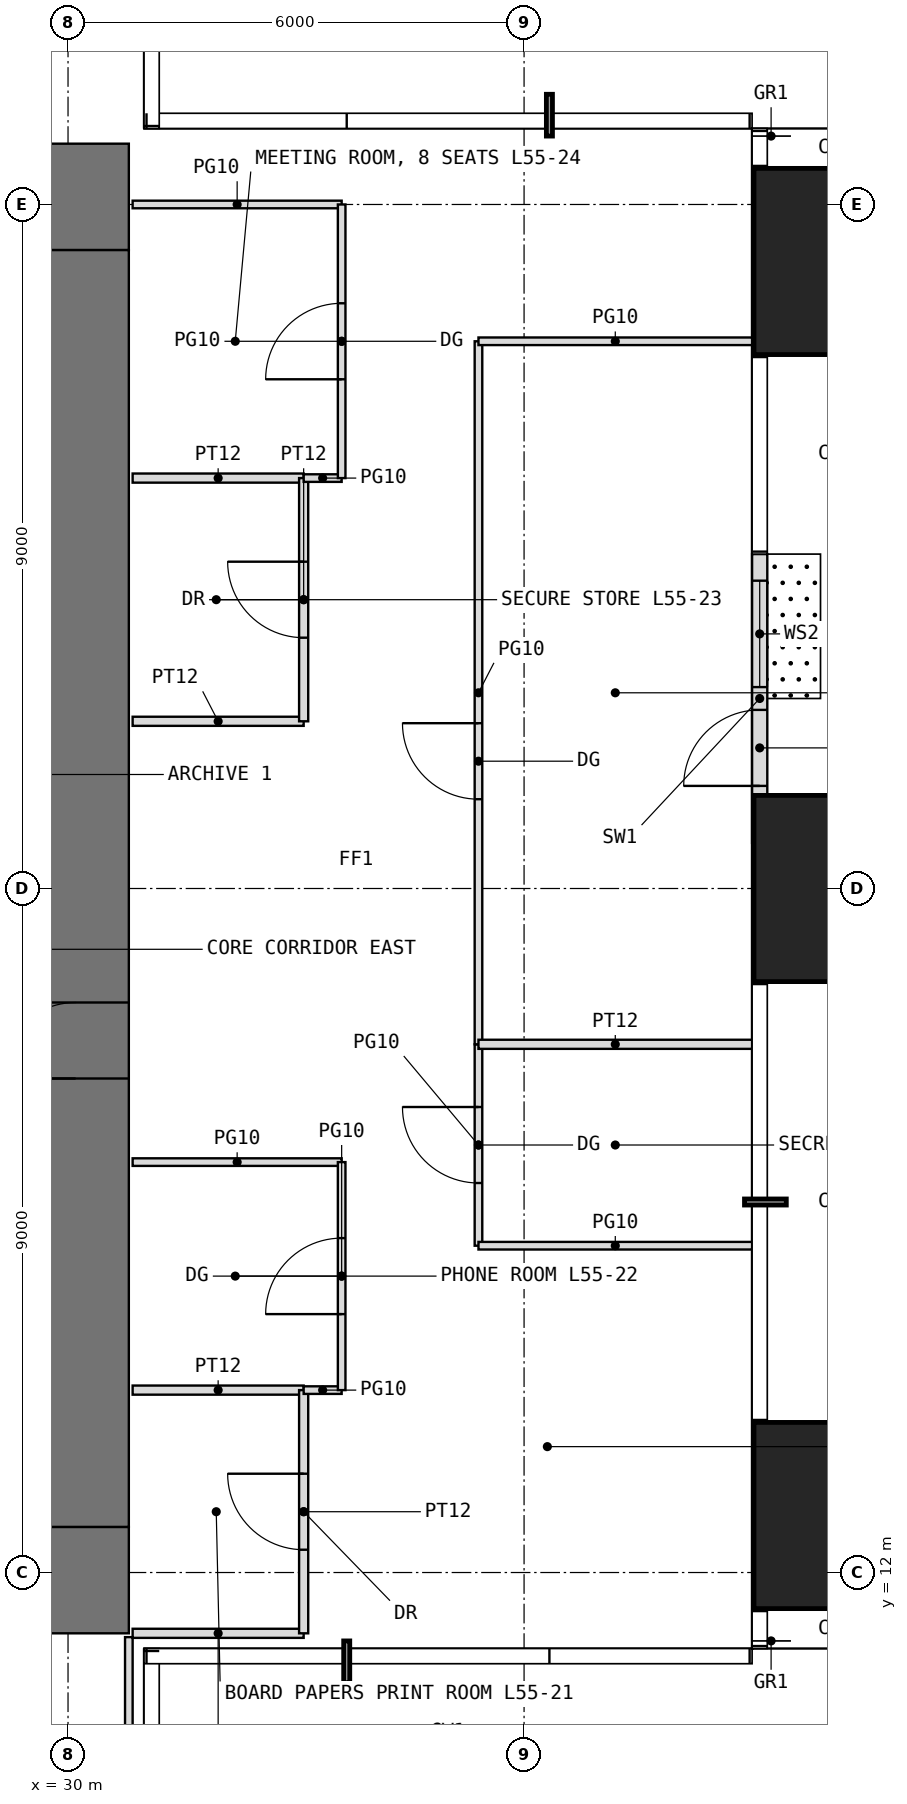
"""IFC4 building model, lengths in metres.
Left out: names, types, materials, properties, quantities, classifications, styles, units other than length and angle.
Written with IfcOpenShell. Run it as: python <this file> out.ifc"""

import sys

from ifc_helpers import new_model, si_unit, direction, frame, frame_2d, origin, origin_2d, place, context, subcontext, project, spatial, rectangle, extrude, element, fill, save


model = new_model("IFC4")
c1 = context("Model", 3, precision=1e-05, world=origin(), true_north=direction((0.0, 1.0)))
c2 = subcontext(c1, "Body", "Model", "MODEL_VIEW")
j1 = project(units=[si_unit("LENGTHUNIT", "METRE"), si_unit("PLANEANGLEUNIT", "RADIAN")], contexts=[c1])
p1 = place(None, origin())
s1 = spatial("IfcSite", under=j1, at=p1, CompositionType="ELEMENT")
p2 = place(p1, origin())
s2 = spatial("IfcBuilding", under=s1, at=p2, CompositionType="ELEMENT")
p3 = place(p2, frame((0.0, 0.0, 230.5)))
s3 = spatial("IfcBuildingStorey", under=s2, at=p3, CompositionType="ELEMENT", Elevation=230.5)
for number, where, z_axis, x_axis in (
    (1, (40.25, 12.75, 0.0), (0.0, 0.0, 1.0), (1.0, 0.0, 0.0)),
    (2, (40.25, 21.0, 0.0), (0.0, 0.0, 1.0), (1.0, 0.0, 0.0)),
    (3, (40.25, 29.25, 0.0), (0.0, 0.0, 1.0), (1.0, 0.0, 0.0)),
):
    element("IfcColumn", number, at=place(p3, frame(where, z_axis=z_axis, x_axis=x_axis)), inside=s3, PredefinedType="COLUMN", context=c2, shape_type="SweptSolid", body=[
        extrude(rectangle(XDim=2.45, YDim=2.45, at=origin_2d()), origin(), (0.0, 0.0, 1.0), 4.0),
    ])
p4 = place(p3, frame((39.1, 21.6, 0.0), z_axis=(0.0, 0.0, 1.0), x_axis=(0.0, 1.0, 0.0)))
e4 = element("IfcWall", 4, at=p4, inside=s3, PredefinedType="USERDEFINED", context=c2, shape_type="SweptSolid", body=[
    extrude(rectangle(XDim=3.8, YDim=0.2, at=frame_2d((1.9, 0.0))), origin(), (0.0, 0.0, 1.0), 3.55),
])
p5 = place(p4, frame((0.75, 0.0, 0.0)))
e5 = element("IfcOpeningElement", 5, at=p5, cuts=e4, PredefinedType="OPENING", context=c2, shape_type="SweptSolid", body=[
    extrude(rectangle(XDim=1.0, YDim=2.4, at=frame_2d((0.5, 1.2))), frame((0.0, 0.11, 0.0), z_axis=(0.0, -1.0, 0.0), x_axis=(1.0, 0.0, 0.0)), (0.0, 0.0, 1.0), 0.22),
])
p6 = place(p4, frame((2.05, 0.0, 0.3)))
e6 = element("IfcOpeningElement", 6, at=p6, cuts=e4, PredefinedType="OPENING", context=c2, shape_type="SweptSolid", body=[
    extrude(rectangle(XDim=1.4, YDim=2.7, at=frame_2d((0.7, 1.35))), frame((0.0, 0.11, 0.0), z_axis=(0.0, -1.0, 0.0), x_axis=(1.0, 0.0, 0.0)), (0.0, 0.0, 1.0), 0.22),
])
p7 = place(p3, frame((11.2, 11.9, -0.05), z_axis=(0.0, 0.0, 1.0), x_axis=(1.0, 0.0, 0.0)))
e7 = element("IfcWall", 7, at=p7, inside=s3, PredefinedType="SHEAR", context=c2, shape_type="SweptSolid", body=[
    extrude(rectangle(XDim=19.6, YDim=1.4, at=frame_2d((9.8, 0.0))), origin(), (0.0, 0.0, 1.0), 3.8),
])
p8 = place(p7, frame((8.8, 0.0, 0.05)))
e8 = element("IfcOpeningElement", 8, at=p8, cuts=e7, PredefinedType="OPENING", context=c2, shape_type="SweptSolid", body=[
    extrude(rectangle(XDim=2.0, YDim=2.2, at=frame_2d((1.0, 1.1))), frame((0.0, 0.71, 0.0), z_axis=(0.0, -1.0, 0.0), x_axis=(1.0, 0.0, 0.0)), (0.0, 0.0, 1.0), 1.42),
])
p9 = place(p3, frame((11.2, 30.1, -0.05), z_axis=(0.0, 0.0, 1.0), x_axis=(1.0, 0.0, 0.0)))
e9 = element("IfcWall", 9, at=p9, inside=s3, PredefinedType="SHEAR", context=c2, shape_type="SweptSolid", body=[
    extrude(rectangle(XDim=19.6, YDim=1.4, at=frame_2d((9.8, 0.0))), origin(), (0.0, 0.0, 1.0), 3.8),
])
p10 = place(p9, frame((8.8, 0.0, 0.05)))
e10 = element("IfcOpeningElement", 10, at=p10, cuts=e9, PredefinedType="OPENING", context=c2, shape_type="SweptSolid", body=[
    extrude(rectangle(XDim=2.0, YDim=2.2, at=frame_2d((1.0, 1.1))), frame((0.0, 0.71, 0.0), z_axis=(0.0, -1.0, 0.0), x_axis=(1.0, 0.0, 0.0)), (0.0, 0.0, 1.0), 1.42),
])
p11 = place(p3, frame((30.1, 12.6, -0.05), z_axis=(0.0, 0.0, 1.0), x_axis=(0.0, 1.0, 0.0)))
e11 = element("IfcWall", 11, at=p11, inside=s3, PredefinedType="SHEAR", context=c2, shape_type="SweptSolid", body=[
    extrude(rectangle(XDim=16.8, YDim=1.4, at=frame_2d((8.4, 0.0))), origin(), (0.0, 0.0, 1.0), 3.8),
])
p12 = place(p11, frame((5.9, 0.0, 0.05)))
e12 = element("IfcOpeningElement", 12, at=p12, cuts=e11, PredefinedType="OPENING", context=c2, shape_type="SweptSolid", body=[
    extrude(rectangle(XDim=1.0, YDim=2.2, at=frame_2d((0.5, 1.1))), frame((0.0, 0.71, 0.0), z_axis=(0.0, -1.0, 0.0), x_axis=(1.0, 0.0, 0.0)), (0.0, 0.0, 1.0), 1.42),
])
p13 = place(p3, frame((30.8, 6.6, 0.0), z_axis=(0.0, 0.0, 1.0), x_axis=(0.0, 1.0, 0.0)))
e13 = element("IfcWall", 13, at=p13, inside=s3, PredefinedType="PARTITIONING", context=c2, shape_type="SweptSolid", body=[
    extrude(rectangle(XDim=4.55, YDim=0.1, at=frame_2d((2.275, 0.0))), origin(), (0.0, 0.0, 1.0), 3.55),
])
for number, where, z_axis, x_axis in (
    (14, (30.85, 11.2, 0.0), (0.0, 0.0, 1.0), (1.0, 0.0, 0.0)),
    (15, (30.85, 14.4, 0.0), (0.0, 0.0, 1.0), (1.0, 0.0, 0.0)),
):
    element("IfcWall", number, at=place(p3, frame(where, z_axis=z_axis, x_axis=x_axis)), inside=s3, PredefinedType="PARTITIONING", context=c2, shape_type="SweptSolid", body=[
        extrude(rectangle(XDim=2.25, YDim=0.12, at=frame_2d((1.125, 0.0))), origin(), (0.0, 0.0, 1.0), 3.55),
    ])
p14 = place(p3, frame((30.85, 17.4, 0.0), z_axis=(0.0, 0.0, 1.0), x_axis=(1.0, 0.0, 0.0)))
e16 = element("IfcWall", 16, at=p14, inside=s3, PredefinedType="PARTITIONING", context=c2, shape_type="SweptSolid", body=[
    extrude(rectangle(XDim=2.75, YDim=0.1, at=frame_2d((1.375, 0.0))), origin(), (0.0, 0.0, 1.0), 3.55),
])
for number, where, z_axis, x_axis in (
    (17, (30.85, 23.2, 0.0), (0.0, 0.0, 1.0), (1.0, 0.0, 0.0)),
    (18, (30.85, 26.4, 0.0), (0.0, 0.0, 1.0), (1.0, 0.0, 0.0)),
):
    element("IfcWall", number, at=place(p3, frame(where, z_axis=z_axis, x_axis=x_axis)), inside=s3, PredefinedType="PARTITIONING", context=c2, shape_type="SweptSolid", body=[
        extrude(rectangle(XDim=2.25, YDim=0.12, at=frame_2d((1.125, 0.0))), origin(), (0.0, 0.0, 1.0), 3.55),
    ])
p15 = place(p3, frame((30.85, 30.0, 0.0), z_axis=(0.0, 0.0, 1.0), x_axis=(1.0, 0.0, 0.0)))
e19 = element("IfcWall", 19, at=p15, inside=s3, PredefinedType="PARTITIONING", context=c2, shape_type="SweptSolid", body=[
    extrude(rectangle(XDim=2.75, YDim=0.1, at=frame_2d((1.375, 0.0))), origin(), (0.0, 0.0, 1.0), 3.55),
])
p16 = place(p3, frame((33.1, 11.2, 0.0), z_axis=(0.0, 0.0, 1.0), x_axis=(0.0, 1.0, 0.0)))
e20 = element("IfcWall", 20, at=p16, inside=s3, PredefinedType="PARTITIONING", context=c2, shape_type="SweptSolid", body=[
    extrude(rectangle(XDim=3.2, YDim=0.12, at=frame_2d((1.6, 0.0))), origin(), (0.0, 0.0, 1.0), 3.55),
])
p17 = place(p16, frame((1.1, 0.0, 0.0)))
e21 = element("IfcOpeningElement", 21, at=p17, cuts=e20, PredefinedType="OPENING", context=c2, shape_type="SweptSolid", body=[
    extrude(rectangle(XDim=1.0, YDim=2.2, at=frame_2d((0.5, 1.1))), frame((0.0, 0.07, 0.0), z_axis=(0.0, -1.0, 0.0), x_axis=(1.0, 0.0, 0.0)), (0.0, 0.0, 1.0), 0.14),
])
p18 = place(p3, frame((33.1, 14.4, 0.0), z_axis=(0.0, 0.0, 1.0), x_axis=(1.0, 0.0, 0.0)))
e22 = element("IfcWall", 22, at=p18, inside=s3, PredefinedType="PARTITIONING", context=c2, shape_type="SweptSolid", body=[
    extrude(rectangle(XDim=0.5, YDim=0.1, at=frame_2d((0.25, 0.0))), origin(), (0.0, 0.0, 1.0), 3.55),
])
p19 = place(p3, frame((33.1, 23.2, 0.0), z_axis=(0.0, 0.0, 1.0), x_axis=(0.0, 1.0, 0.0)))
e23 = element("IfcWall", 23, at=p19, inside=s3, PredefinedType="PARTITIONING", context=c2, shape_type="SweptSolid", body=[
    extrude(rectangle(XDim=3.2, YDim=0.12, at=frame_2d((1.6, 0.0))), origin(), (0.0, 0.0, 1.0), 3.55),
])
p20 = place(p19, frame((1.1, 0.0, 0.0)))
e24 = element("IfcOpeningElement", 24, at=p20, cuts=e23, PredefinedType="OPENING", context=c2, shape_type="SweptSolid", body=[
    extrude(rectangle(XDim=1.0, YDim=2.2, at=frame_2d((0.5, 1.1))), frame((0.0, 0.07, 0.0), z_axis=(0.0, -1.0, 0.0), x_axis=(1.0, 0.0, 0.0)), (0.0, 0.0, 1.0), 0.14),
])
p21 = place(p3, frame((33.1, 26.4, 0.0), z_axis=(0.0, 0.0, 1.0), x_axis=(1.0, 0.0, 0.0)))
e25 = element("IfcWall", 25, at=p21, inside=s3, PredefinedType="PARTITIONING", context=c2, shape_type="SweptSolid", body=[
    extrude(rectangle(XDim=0.5, YDim=0.1, at=frame_2d((0.25, 0.0))), origin(), (0.0, 0.0, 1.0), 3.55),
])
p22 = place(p3, frame((33.6, 14.4, 0.0), z_axis=(0.0, 0.0, 1.0), x_axis=(0.0, 1.0, 0.0)))
e26 = element("IfcWall", 26, at=p22, inside=s3, PredefinedType="PARTITIONING", context=c2, shape_type="SweptSolid", body=[
    extrude(rectangle(XDim=3.0, YDim=0.1, at=frame_2d((1.5, 0.0))), origin(), (0.0, 0.0, 1.0), 3.55),
])
p23 = place(p22, frame((1.0, 0.0, 0.0)))
e27 = element("IfcOpeningElement", 27, at=p23, cuts=e26, PredefinedType="OPENING", context=c2, shape_type="SweptSolid", body=[
    extrude(rectangle(XDim=1.0, YDim=2.4, at=frame_2d((0.5, 1.2))), frame((0.0, 0.06, 0.0), z_axis=(0.0, -1.0, 0.0), x_axis=(1.0, 0.0, 0.0)), (0.0, 0.0, 1.0), 0.12),
])
p24 = place(p3, frame((33.6, 26.4, 0.0), z_axis=(0.0, 0.0, 1.0), x_axis=(0.0, 1.0, 0.0)))
e28 = element("IfcWall", 28, at=p24, inside=s3, PredefinedType="PARTITIONING", context=c2, shape_type="SweptSolid", body=[
    extrude(rectangle(XDim=3.6, YDim=0.1, at=frame_2d((1.8, 0.0))), origin(), (0.0, 0.0, 1.0), 3.55),
])
p25 = place(p24, frame((1.3, 0.0, 0.0)))
e29 = element("IfcOpeningElement", 29, at=p25, cuts=e28, PredefinedType="OPENING", context=c2, shape_type="SweptSolid", body=[
    extrude(rectangle(XDim=1.0, YDim=2.4, at=frame_2d((0.5, 1.2))), frame((0.0, 0.06, 0.0), z_axis=(0.0, -1.0, 0.0), x_axis=(1.0, 0.0, 0.0)), (0.0, 0.0, 1.0), 0.12),
])
p26 = place(p3, frame((35.4, 16.3, 0.0), z_axis=(0.0, 0.0, 1.0), x_axis=(0.0, 1.0, 0.0)))
e30 = element("IfcWall", 30, at=p26, inside=s3, PredefinedType="PARTITIONING", context=c2, shape_type="SweptSolid", body=[
    extrude(rectangle(XDim=2.65, YDim=0.1, at=frame_2d((1.325, 0.0))), origin(), (0.0, 0.0, 1.0), 3.55),
])
p27 = place(p26, frame((0.825, 0.0, 0.0)))
e31 = element("IfcOpeningElement", 31, at=p27, cuts=e30, PredefinedType="OPENING", context=c2, shape_type="SweptSolid", body=[
    extrude(rectangle(XDim=1.0, YDim=2.4, at=frame_2d((0.5, 1.2))), frame((0.0, 0.06, 0.0), z_axis=(0.0, -1.0, 0.0), x_axis=(1.0, 0.0, 0.0)), (0.0, 0.0, 1.0), 0.12),
])
p28 = place(p3, frame((35.4, 16.3, 0.0), z_axis=(0.0, 0.0, 1.0), x_axis=(1.0, 0.0, 0.0)))
e32 = element("IfcWall", 32, at=p28, inside=s3, PredefinedType="PARTITIONING", context=c2, shape_type="SweptSolid", body=[
    extrude(rectangle(XDim=3.6, YDim=0.1, at=frame_2d((1.8, 0.0))), origin(), (0.0, 0.0, 1.0), 3.55),
])
p29 = place(p3, frame((35.4, 18.95, 0.0), z_axis=(0.0, 0.0, 1.0), x_axis=(0.0, 1.0, 0.0)))
e33 = element("IfcWall", 33, at=p29, inside=s3, PredefinedType="PARTITIONING", context=c2, shape_type="SweptSolid", body=[
    extrude(rectangle(XDim=9.25, YDim=0.1, at=frame_2d((4.625, 0.0))), origin(), (0.0, 0.0, 1.0), 3.55),
])
p30 = place(p29, frame((3.225, 0.0, 0.0)))
e34 = element("IfcOpeningElement", 34, at=p30, cuts=e33, PredefinedType="OPENING", context=c2, shape_type="SweptSolid", body=[
    extrude(rectangle(XDim=1.0, YDim=2.4, at=frame_2d((0.5, 1.2))), frame((0.0, 0.06, 0.0), z_axis=(0.0, -1.0, 0.0), x_axis=(1.0, 0.0, 0.0)), (0.0, 0.0, 1.0), 0.12),
])
p31 = place(p3, frame((35.4, 18.95, 0.0), z_axis=(0.0, 0.0, 1.0), x_axis=(1.0, 0.0, 0.0)))
e35 = element("IfcWall", 35, at=p31, inside=s3, PredefinedType="PARTITIONING", context=c2, shape_type="SweptSolid", body=[
    extrude(rectangle(XDim=3.6, YDim=0.12, at=frame_2d((1.8, 0.0))), origin(), (0.0, 0.0, 1.0), 3.55),
])
p32 = place(p3, frame((35.4, 28.2, 0.0), z_axis=(0.0, 0.0, 1.0), x_axis=(1.0, 0.0, 0.0)))
e36 = element("IfcWall", 36, at=p32, inside=s3, PredefinedType="PARTITIONING", context=c2, shape_type="SweptSolid", body=[
    extrude(rectangle(XDim=3.6, YDim=0.1, at=frame_2d((1.8, 0.0))), origin(), (0.0, 0.0, 1.0), 3.55),
])
p33 = place(p5, origin())
e37 = element("IfcDoor", 37, at=p33, inside=s3, OperationType="SINGLE_SWING_LEFT", PredefinedType="DOOR", context=c2, shape_type="SweptSolid", body=[
    extrude(rectangle(XDim=1.0, YDim=2.4, at=frame_2d((0.5, 1.2))), frame((0.0, 0.025, 0.0), z_axis=(0.0, -1.0, 0.0), x_axis=(1.0, 0.0, 0.0)), (0.0, 0.0, 1.0), 0.05),
])
fill(e5, e37)
p34 = place(p6, origin())
e38 = element("IfcWindow", 38, at=p34, inside=s3, PartitioningType="SINGLE_PANEL", PredefinedType="WINDOW", context=c2, shape_type="SweptSolid", body=[
    extrude(rectangle(XDim=1.4, YDim=2.7, at=frame_2d((0.7, 1.35))), frame((0.0, 0.03, 0.0), z_axis=(0.0, -1.0, 0.0), x_axis=(1.0, 0.0, 0.0)), (0.0, 0.0, 1.0), 0.06),
])
fill(e6, e38)
p35 = place(p12, origin())
e39 = element("IfcDoor", 39, at=p35, inside=s3, OperationType="SINGLE_SWING_LEFT", PredefinedType="DOOR", context=c2, shape_type="SweptSolid", body=[
    extrude(rectangle(XDim=1.0, YDim=2.2, at=frame_2d((0.5, 1.1))), frame((0.0, 0.025, 0.0), z_axis=(0.0, -1.0, 0.0), x_axis=(1.0, 0.0, 0.0)), (0.0, 0.0, 1.0), 0.05),
])
fill(e12, e39)
p36 = place(p17, origin())
e40 = element("IfcDoor", 40, at=p36, inside=s3, OperationType="SINGLE_SWING_RIGHT", PredefinedType="DOOR", context=c2, shape_type="SweptSolid", body=[
    extrude(rectangle(XDim=1.0, YDim=2.2, at=frame_2d((0.5, 1.1))), frame((0.0, 0.025, 0.0), z_axis=(0.0, -1.0, 0.0), x_axis=(1.0, 0.0, 0.0)), (0.0, 0.0, 1.0), 0.05),
])
fill(e21, e40)
p37 = place(p23, origin())
e41 = element("IfcDoor", 41, at=p37, inside=s3, OperationType="SINGLE_SWING_LEFT", PredefinedType="DOOR", context=c2, shape_type="SweptSolid", body=[
    extrude(rectangle(XDim=1.0, YDim=2.4, at=frame_2d((0.5, 1.2))), frame((0.0, 0.025, 0.0), z_axis=(0.0, -1.0, 0.0), x_axis=(1.0, 0.0, 0.0)), (0.0, 0.0, 1.0), 0.05),
])
fill(e27, e41)
p38 = place(p20, origin())
e42 = element("IfcDoor", 42, at=p38, inside=s3, OperationType="SINGLE_SWING_RIGHT", PredefinedType="DOOR", context=c2, shape_type="SweptSolid", body=[
    extrude(rectangle(XDim=1.0, YDim=2.2, at=frame_2d((0.5, 1.1))), frame((0.0, 0.025, 0.0), z_axis=(0.0, -1.0, 0.0), x_axis=(1.0, 0.0, 0.0)), (0.0, 0.0, 1.0), 0.05),
])
fill(e24, e42)
p39 = place(p25, origin())
e43 = element("IfcDoor", 43, at=p39, inside=s3, OperationType="SINGLE_SWING_LEFT", PredefinedType="DOOR", context=c2, shape_type="SweptSolid", body=[
    extrude(rectangle(XDim=1.0, YDim=2.4, at=frame_2d((0.5, 1.2))), frame((0.0, 0.025, 0.0), z_axis=(0.0, -1.0, 0.0), x_axis=(1.0, 0.0, 0.0)), (0.0, 0.0, 1.0), 0.05),
])
fill(e29, e43)
p40 = place(p27, origin())
e44 = element("IfcDoor", 44, at=p40, inside=s3, OperationType="SINGLE_SWING_RIGHT", PredefinedType="DOOR", context=c2, shape_type="SweptSolid", body=[
    extrude(rectangle(XDim=1.0, YDim=2.4, at=frame_2d((0.5, 1.2))), frame((0.0, 0.025, 0.0), z_axis=(0.0, -1.0, 0.0), x_axis=(1.0, 0.0, 0.0)), (0.0, 0.0, 1.0), 0.05),
])
fill(e31, e44)
p41 = place(p30, origin())
e45 = element("IfcDoor", 45, at=p41, inside=s3, OperationType="SINGLE_SWING_RIGHT", PredefinedType="DOOR", context=c2, shape_type="SweptSolid", body=[
    extrude(rectangle(XDim=1.0, YDim=2.4, at=frame_2d((0.5, 1.2))), frame((0.0, 0.025, 0.0), z_axis=(0.0, -1.0, 0.0), x_axis=(1.0, 0.0, 0.0)), (0.0, 0.0, 1.0), 0.05),
])
fill(e34, e45)
save(model, sys.argv[1])
